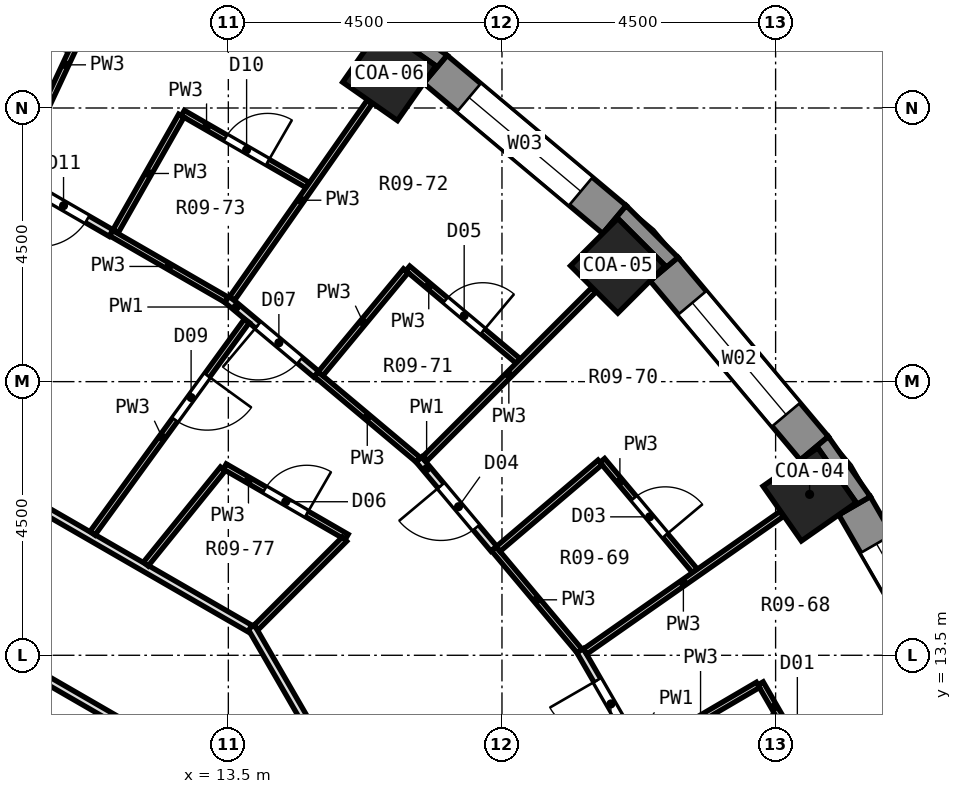
"""IFC4 building model, lengths in metres.
Left out: names, types, materials, properties, quantities, classifications, styles, units other than length and angle.
Written with IfcOpenShell. Run it as: python <this file> out.ifc"""

import sys

from ifc_helpers import new_model, si_unit, direction, frame, frame_2d, origin, origin_2d, place, context, subcontext, project, spatial, polyline, rectangle, outline, extrude, element, fill, save


model = new_model("IFC4")
c1 = context("Model", 3, precision=1e-05, world=origin(), true_north=direction((0.0, 1.0)))
c2 = subcontext(c1, "Body", "Model", "MODEL_VIEW")
j1 = project(units=[si_unit("LENGTHUNIT", "METRE"), si_unit("PLANEANGLEUNIT", "RADIAN")], contexts=[c1])
p1 = place(None, origin())
s1 = spatial("IfcSite", under=j1, at=p1, CompositionType="ELEMENT")
p2 = place(p1, origin())
s2 = spatial("IfcBuilding", under=s1, at=p2, CompositionType="ELEMENT")
p3 = place(p2, frame((0.0, 0.0, 26.3)))
s3 = spatial("IfcBuildingStorey", under=s2, at=p3, CompositionType="ELEMENT", Elevation=26.3)
p4 = place(p3, frame((23.059, 16.146, -0.55), z_axis=(0.0, 0.0, 1.0), x_axis=(0.819152044289, 0.573576436351, 0.0)))
e1 = element("IfcColumn", 1, at=p4, inside=s3, PredefinedType="COLUMN", context=c2, shape_type="SweptSolid", body=[
    extrude(rectangle(XDim=1.1, YDim=1.1, at=origin_2d()), origin(), (0.0, 0.0, 1.0), 3.85),
])
p5 = place(p3, frame((19.905, 19.905, 0.0), z_axis=(0.0, 0.0, 1.0), x_axis=(0.707106781187, 0.707106781187, 0.0)))
e2 = element("IfcColumn", 2, at=p5, inside=s3, PredefinedType="COLUMN", context=c2, shape_type="SweptSolid", body=[
    extrude(rectangle(XDim=1.1, YDim=1.1, at=origin_2d()), origin(), (0.0, 0.0, 1.0), 3.3),
])
p6 = place(p3, frame((16.146, 23.059, -0.55), z_axis=(0.0, 0.0, 1.0), x_axis=(0.573576436351, 0.819152044289, 0.0)))
e3 = element("IfcColumn", 3, at=p6, inside=s3, PredefinedType="COLUMN", context=c2, shape_type="SweptSolid", body=[
    extrude(rectangle(XDim=1.1, YDim=1.1, at=origin_2d()), origin(), (0.0, 0.0, 1.0), 3.85),
])
p7 = place(p3, frame((25.721, 12.63, 0.0), z_axis=(0.0, 0.0, 1.0), x_axis=(-0.499989888488, 0.86603124159, 0.0)))
e4 = element("IfcWall", 4, at=p7, inside=s3, PredefinedType="SOLIDWALL", context=c2, shape_type="SweptSolid", body=[
    extrude(rectangle(XDim=3.846, YDim=0.6, at=frame_2d((1.923, 0.0))), origin(), (0.0, 0.0, 1.0), 2.75),
])
p8 = place(p7, frame((0.723, 0.0, 0.9)))
e5 = element("IfcOpeningElement", 5, at=p8, cuts=e4, PredefinedType="OPENING", context=c2, shape_type="SweptSolid", body=[
    extrude(rectangle(XDim=2.4, YDim=1.8, at=frame_2d((1.2, 0.9))), frame((0.0, 0.312, 0.0), z_axis=(0.0, -1.0, 0.0), x_axis=(1.0, 0.0, 0.0)), (0.0, 0.0, 1.0), 0.624),
])
p9 = place(p3, frame((23.137, 16.904, 0.0), z_axis=(0.0, 0.0, 1.0), x_axis=(-0.642809392687, 0.766026164483, 0.0)))
e6 = element("IfcWall", 6, at=p9, inside=s3, PredefinedType="SOLIDWALL", context=c2, shape_type="SweptSolid", body=[
    extrude(rectangle(XDim=3.846, YDim=0.6, at=frame_2d((1.923, 0.0))), origin(), (0.0, 0.0, 1.0), 2.75),
])
p10 = place(p9, frame((0.723, 0.0, 0.9)))
e7 = element("IfcOpeningElement", 7, at=p10, cuts=e6, PredefinedType="OPENING", context=c2, shape_type="SweptSolid", body=[
    extrude(rectangle(XDim=2.4, YDim=1.8, at=frame_2d((1.2, 0.9))), frame((0.0, 0.312, 0.0), z_axis=(0.0, -1.0, 0.0), x_axis=(1.0, 0.0, 0.0)), (0.0, 0.0, 1.0), 0.624),
])
p11 = place(p3, frame((19.85, 20.665, 0.0), z_axis=(0.0, 0.0, 1.0), x_axis=(-0.766026164483, 0.642809392687, 0.0)))
e8 = element("IfcWall", 8, at=p11, inside=s3, PredefinedType="SOLIDWALL", context=c2, shape_type="SweptSolid", body=[
    extrude(rectangle(XDim=3.846, YDim=0.6, at=frame_2d((1.923, 0.0))), origin(), (0.0, 0.0, 1.0), 2.75),
])
p12 = place(p11, frame((0.723, 0.0, 0.9)))
e9 = element("IfcOpeningElement", 9, at=p12, cuts=e8, PredefinedType="OPENING", context=c2, shape_type="SweptSolid", body=[
    extrude(rectangle(XDim=2.4, YDim=1.8, at=frame_2d((1.2, 0.9))), frame((0.0, 0.312, 0.0), z_axis=(0.0, -1.0, 0.0), x_axis=(1.0, 0.0, 0.0)), (0.0, 0.0, 1.0), 0.624),
])
p13 = place(p3, origin())
e10 = element("IfcWall", 10, at=p13, inside=s3, PredefinedType="SOLIDWALL", context=c2, shape_type="SweptSolid", body=[
    extrude(outline(polyline([(24.058, 16.11), (23.367, 17.097), (22.907, 16.711), (23.194, 16.912), (23.825, 16.011), (23.538, 15.81), (24.058, 16.11)])), origin(), (0.0, 0.0, 1.0), 2.75),
])
p14 = place(p3, origin())
e11 = element("IfcWall", 11, at=p14, inside=s3, PredefinedType="SOLIDWALL", context=c2, shape_type="SweptSolid", body=[
    extrude(outline(polyline([(20.043, 20.895), (19.657, 20.435), (19.905, 20.683), (20.683, 19.905), (20.435, 19.657), (20.895, 20.043), (20.043, 20.895)])), origin(), (0.0, 0.0, 1.0), 2.75),
])
p15 = place(p3, origin())
e12 = element("IfcWall", 12, at=p15, inside=s3, PredefinedType="SOLIDWALL", context=c2, shape_type="SweptSolid", body=[
    extrude(outline(polyline([(17.097, 23.367), (16.11, 24.058), (15.81, 23.538), (16.011, 23.825), (16.912, 23.194), (16.711, 22.907), (17.097, 23.367)])), origin(), (0.0, 0.0, 1.0), 2.75),
])
p16 = place(p3, frame((13.873, 13.971, 0.0), z_axis=(0.0, 0.0, 1.0), x_axis=(0.500063859158, -0.865988531543, 0.0)))
e13 = element("IfcWall", 13, at=p16, inside=s3, PredefinedType="PARTITIONING", context=c2, shape_type="SweptSolid", body=[
    extrude(rectangle(XDim=4.168, YDim=0.125, at=frame_2d((2.084, 0.0))), origin(), (0.0, 0.0, 1.0), 2.75),
])
p17 = place(p3, frame((19.283, 13.58, 0.0), z_axis=(0.0, 0.0, 1.0), x_axis=(0.500206547268, -0.865906120818, 0.0)))
e14 = element("IfcWall", 14, at=p17, inside=s3, PredefinedType="PARTITIONING", context=c2, shape_type="SweptSolid", body=[
    extrude(rectangle(XDim=3.492, YDim=0.125, at=frame_2d((1.746, 0.0))), origin(), (0.0, 0.0, 1.0), 2.75),
])
p18 = place(p17, frame((0.566, 0.0, 0.0)))
e15 = element("IfcOpeningElement", 15, at=p18, cuts=e14, PredefinedType="OPENING", context=c2, shape_type="SweptSolid", body=[
    extrude(rectangle(XDim=0.9, YDim=2.1, at=frame_2d((0.45, 1.05))), frame((0.0, 0.074, 0.0), z_axis=(0.0, -1.0, 0.0), x_axis=(1.0, 0.0, 0.0)), (0.0, 0.0, 1.0), 0.149),
])
p19 = place(p3, frame((22.252, 13.038, 0.0), z_axis=(0.0, 0.0, 1.0), x_axis=(0.500073288705, -0.865983086396, 0.0)))
e16 = element("IfcWall", 16, at=p19, inside=s3, PredefinedType="PARTITIONING", context=c2, shape_type="SweptSolid", body=[
    extrude(rectangle(XDim=2.369, YDim=0.1, at=frame_2d((1.185, 0.0))), origin(), (0.0, 0.0, 1.0), 2.75),
])
p20 = place(p19, frame((0.811, 0.0, 0.0)))
e17 = element("IfcOpeningElement", 17, at=p20, cuts=e16, PredefinedType="OPENING", context=c2, shape_type="SweptSolid", body=[
    extrude(rectangle(XDim=0.8, YDim=2.1, at=frame_2d((0.4, 1.05))), frame((0.0, 0.062, 0.0), z_axis=(0.0, -1.0, 0.0), x_axis=(1.0, 0.0, 0.0)), (0.0, 0.0, 1.0), 0.124),
])
p21 = place(p3, frame((17.865, 15.252, 0.0), z_axis=(0.0, 0.0, 1.0), x_axis=(0.642711379907, -0.766108401036, 0.0)))
e18 = element("IfcWall", 18, at=p21, inside=s3, PredefinedType="PARTITIONING", context=c2, shape_type="SweptSolid", body=[
    extrude(rectangle(XDim=2.192, YDim=0.1, at=frame_2d((1.096, 0.0))), origin(), (0.0, 0.0, 1.0), 2.75),
])
p22 = place(p3, frame((16.632, 16.722, 0.0), z_axis=(0.0, 0.0, 1.0), x_axis=(0.64304586183, -0.765827669638, 0.0)))
e19 = element("IfcWall", 19, at=p22, inside=s3, PredefinedType="PARTITIONING", context=c2, shape_type="SweptSolid", body=[
    extrude(rectangle(XDim=1.919, YDim=0.125, at=frame_2d((0.959, 0.0))), origin(), (0.0, 0.0, 1.0), 2.75),
])
p23 = place(p22, frame((0.566, 0.0, 0.0)))
e20 = element("IfcOpeningElement", 20, at=p23, cuts=e19, PredefinedType="OPENING", context=c2, shape_type="SweptSolid", body=[
    extrude(rectangle(XDim=0.9, YDim=2.1, at=frame_2d((0.45, 1.05))), frame((0.0, 0.074, 0.0), z_axis=(0.0, -1.0, 0.0), x_axis=(1.0, 0.0, 0.0)), (0.0, 0.0, 1.0), 0.149),
])
p24 = place(p3, frame((19.65, 16.704, 0.0), z_axis=(0.0, 0.0, 1.0), x_axis=(0.642631758034, -0.766175191171, 0.0)))
e21 = element("IfcWall", 21, at=p24, inside=s3, PredefinedType="PARTITIONING", context=c2, shape_type="SweptSolid", body=[
    extrude(rectangle(XDim=2.371, YDim=0.1, at=frame_2d((1.186, 0.0))), origin(), (0.0, 0.0, 1.0), 2.75),
])
p25 = place(p24, frame((0.811, 0.0, 0.0)))
e22 = element("IfcOpeningElement", 22, at=p25, cuts=e21, PredefinedType="OPENING", context=c2, shape_type="SweptSolid", body=[
    extrude(rectangle(XDim=0.8, YDim=2.1, at=frame_2d((0.4, 1.05))), frame((0.0, 0.062, 0.0), z_axis=(0.0, -1.0, 0.0), x_axis=(1.0, 0.0, 0.0)), (0.0, 0.0, 1.0), 0.124),
])
p26 = place(p3, frame((14.946, 18.123, 0.0), z_axis=(0.0, 0.0, 1.0), x_axis=(0.765889072534, -0.642972727705, 0.0)))
e23 = element("IfcWall", 23, at=p26, inside=s3, PredefinedType="PARTITIONING", context=c2, shape_type="SweptSolid", body=[
    extrude(rectangle(XDim=2.193, YDim=0.1, at=frame_2d((1.096, 0.0))), origin(), (0.0, 0.0, 1.0), 2.75),
])
p27 = place(p3, frame((13.476, 19.356, 0.0), z_axis=(0.0, 0.0, 1.0), x_axis=(0.76614099915, -0.642672521135, 0.0)))
e24 = element("IfcWall", 24, at=p27, inside=s3, PredefinedType="PARTITIONING", context=c2, shape_type="SweptSolid", body=[
    extrude(rectangle(XDim=1.918, YDim=0.125, at=frame_2d((0.959, 0.0))), origin(), (0.0, 0.0, 1.0), 2.75),
])
p28 = place(p27, frame((0.666, 0.0, 0.0)))
e25 = element("IfcOpeningElement", 25, at=p28, cuts=e24, PredefinedType="OPENING", context=c2, shape_type="SweptSolid", body=[
    extrude(rectangle(XDim=0.9, YDim=2.1, at=frame_2d((0.45, 1.05))), frame((0.0, 0.074, 0.0), z_axis=(0.0, -1.0, 0.0), x_axis=(1.0, 0.0, 0.0)), (0.0, 0.0, 1.0), 0.149),
])
p29 = place(p3, frame((16.451, 19.862, 0.0), z_axis=(0.0, 0.0, 1.0), x_axis=(0.766132669123, -0.642682451373, 0.0)))
e26 = element("IfcWall", 26, at=p29, inside=s3, PredefinedType="PARTITIONING", context=c2, shape_type="SweptSolid", body=[
    extrude(rectangle(XDim=2.371, YDim=0.1, at=frame_2d((1.186, 0.0))), origin(), (0.0, 0.0, 1.0), 2.75),
])
p30 = place(p29, frame((0.811, 0.0, 0.0)))
e27 = element("IfcOpeningElement", 27, at=p30, cuts=e26, PredefinedType="OPENING", context=c2, shape_type="SweptSolid", body=[
    extrude(rectangle(XDim=0.8, YDim=2.1, at=frame_2d((0.4, 1.05))), frame((0.0, 0.062, 0.0), z_axis=(0.0, -1.0, 0.0), x_axis=(1.0, 0.0, 0.0)), (0.0, 0.0, 1.0), 0.124),
])
p31 = place(p3, frame((4.385, 16.636, 0.0), z_axis=(0.0, 0.0, 1.0), x_axis=(0.866033263559, -0.499986386223, 0.0)))
e28 = element("IfcWall", 28, at=p31, inside=s3, PredefinedType="PARTITIONING", context=c2, shape_type="SweptSolid", body=[
    extrude(rectangle(XDim=8.968, YDim=0.125, at=frame_2d((4.484, 0.0))), origin(), (0.0, 0.0, 1.0), 2.75),
])
p32 = place(p3, frame((5.029, 19.036, 0.0), z_axis=(0.0, 0.0, 1.0), x_axis=(0.866024825845, -0.50000100102, 0.0)))
e29 = element("IfcWall", 29, at=p32, inside=s3, PredefinedType="PARTITIONING", context=c2, shape_type="SweptSolid", body=[
    extrude(rectangle(XDim=10.192, YDim=0.125, at=frame_2d((5.096, 0.0))), origin(), (0.0, 0.0, 1.0), 2.75),
])
p33 = place(p32, frame((3.116, 0.0, 0.0)))
e30 = element("IfcOpeningElement", 30, at=p33, cuts=e29, PredefinedType="OPENING", context=c2, shape_type="SweptSolid", body=[
    extrude(rectangle(XDim=1.0, YDim=2.1, at=frame_2d((0.5, 1.05))), frame((0.0, 0.074, 0.0), z_axis=(0.0, -1.0, 0.0), x_axis=(1.0, 0.0, 0.0)), (0.0, 0.0, 1.0), 0.149),
])
p34 = place(p3, frame((13.441, 16.604, 0.0), z_axis=(0.0, 0.0, 1.0), x_axis=(0.865969595378, -0.500096650539, 0.0)))
e31 = element("IfcWall", 31, at=p34, inside=s3, PredefinedType="PARTITIONING", context=c2, shape_type="SweptSolid", body=[
    extrude(rectangle(XDim=2.315, YDim=0.1, at=frame_2d((1.158, 0.0))), origin(), (0.0, 0.0, 1.0), 2.75),
])
p35 = place(p34, frame((0.758, 0.0, 0.0)))
e32 = element("IfcOpeningElement", 32, at=p35, cuts=e31, PredefinedType="OPENING", context=c2, shape_type="SweptSolid", body=[
    extrude(rectangle(XDim=0.8, YDim=2.1, at=frame_2d((0.4, 1.05))), frame((0.0, 0.062, 0.0), z_axis=(0.0, -1.0, 0.0), x_axis=(1.0, 0.0, 0.0)), (0.0, 0.0, 1.0), 0.124),
])
p36 = place(p3, frame((11.572, 20.443, 0.0), z_axis=(0.0, 0.0, 1.0), x_axis=(0.865939000713, -0.500149624657, 0.0)))
e33 = element("IfcWall", 33, at=p36, inside=s3, PredefinedType="PARTITIONING", context=c2, shape_type="SweptSolid", body=[
    extrude(rectangle(XDim=2.193, YDim=0.1, at=frame_2d((1.097, 0.0))), origin(), (0.0, 0.0, 1.0), 2.75),
])
p37 = place(p3, frame((9.91, 21.402, 0.0), z_axis=(0.0, 0.0, 1.0), x_axis=(0.866191941426, -0.499711437341, 0.0)))
e34 = element("IfcWall", 34, at=p37, inside=s3, PredefinedType="PARTITIONING", context=c2, shape_type="SweptSolid", body=[
    extrude(rectangle(XDim=1.919, YDim=0.125, at=frame_2d((0.959, 0.0))), origin(), (0.0, 0.0, 1.0), 2.75),
])
p38 = place(p37, frame((0.566, 0.0, 0.0)))
e35 = element("IfcOpeningElement", 35, at=p38, cuts=e34, PredefinedType="OPENING", context=c2, shape_type="SweptSolid", body=[
    extrude(rectangle(XDim=0.9, YDim=2.1, at=frame_2d((0.45, 1.05))), frame((0.0, 0.074, 0.0), z_axis=(0.0, -1.0, 0.0), x_axis=(1.0, 0.0, 0.0)), (0.0, 0.0, 1.0), 0.149),
])
p39 = place(p3, frame((12.752, 22.417, 0.0), z_axis=(0.0, 0.0, 1.0), x_axis=(0.865984969814, -0.500070027153, 0.0)))
e36 = element("IfcWall", 36, at=p39, inside=s3, PredefinedType="PARTITIONING", context=c2, shape_type="SweptSolid", body=[
    extrude(rectangle(XDim=2.371, YDim=0.1, at=frame_2d((1.186, 0.0))), origin(), (0.0, 0.0, 1.0), 2.75),
])
p40 = place(p39, frame((0.811, 0.0, 0.0)))
e37 = element("IfcOpeningElement", 37, at=p40, cuts=e36, PredefinedType="OPENING", context=c2, shape_type="SweptSolid", body=[
    extrude(rectangle(XDim=0.8, YDim=2.1, at=frame_2d((0.4, 1.05))), frame((0.0, 0.062, 0.0), z_axis=(0.0, -1.0, 0.0), x_axis=(1.0, 0.0, 0.0)), (0.0, 0.0, 1.0), 0.124),
])
p41 = place(p3, frame((20.322, 11.906, 0.0), z_axis=(0.0, 0.0, 1.0), x_axis=(0.862687894762, 0.505736686657, 0.0)))
e38 = element("IfcWall", 38, at=p41, inside=s3, PredefinedType="PARTITIONING", context=c2, shape_type="SweptSolid", body=[
    extrude(rectangle(XDim=2.187, YDim=0.1, at=frame_2d((1.094, 0.0))), origin(), (0.0, 0.0, 1.0), 2.75),
])
p42 = place(p3, frame((19.366, 13.561, 0.0), z_axis=(0.0, 0.0, 1.0), x_axis=(0.819199961449, 0.57350799747, 0.0)))
e39 = element("IfcWall", 39, at=p42, inside=s3, PredefinedType="PARTITIONING", context=c2, shape_type="SweptSolid", body=[
    extrude(rectangle(XDim=3.948, YDim=0.1, at=frame_2d((1.974, 0.0))), origin(), (0.0, 0.0, 1.0), 2.75),
])
p43 = place(p3, frame((17.936, 15.246, 0.0), z_axis=(0.0, 0.0, 1.0), x_axis=(0.76174213422, 0.647880329192, 0.0)))
e40 = element("IfcWall", 40, at=p43, inside=s3, PredefinedType="PARTITIONING", context=c2, shape_type="SweptSolid", body=[
    extrude(rectangle(XDim=2.2, YDim=0.1, at=frame_2d((1.1, 0.0))), origin(), (0.0, 0.0, 1.0), 2.75),
])
p44 = place(p3, frame((13.953, 13.953, 0.0), z_axis=(0.0, 0.0, 1.0), x_axis=(0.707106781187, 0.707106781187, 0.0)))
e41 = element("IfcWall", 41, at=p44, inside=s3, PredefinedType="PARTITIONING", context=c2, shape_type="SweptSolid", body=[
    extrude(rectangle(XDim=2.061, YDim=0.1, at=frame_2d((1.031, 0.0))), origin(), (0.0, 0.0, 1.0), 2.75),
])
p45 = place(p3, frame((16.717, 16.717, 0.0), z_axis=(0.0, 0.0, 1.0), x_axis=(0.707106781187, 0.707106781187, 0.0)))
e42 = element("IfcWall", 42, at=p45, inside=s3, PredefinedType="PARTITIONING", context=c2, shape_type="SweptSolid", body=[
    extrude(rectangle(XDim=3.948, YDim=0.1, at=frame_2d((1.974, 0.0))), origin(), (0.0, 0.0, 1.0), 2.75),
])
p46 = place(p3, frame((15.016, 18.129, 0.0), z_axis=(0.0, 0.0, 1.0), x_axis=(0.63792197303, 0.770101003976, 0.0)))
e43 = element("IfcWall", 43, at=p46, inside=s3, PredefinedType="PARTITIONING", context=c2, shape_type="SweptSolid", body=[
    extrude(rectangle(XDim=2.2, YDim=0.1, at=frame_2d((1.1, 0.0))), origin(), (0.0, 0.0, 1.0), 2.75),
])
p47 = place(p3, frame((12.143, 15.0, 0.0), z_axis=(0.0, 0.0, 1.0), x_axis=(0.629135445443, 0.777295691026, 0.0)))
e44 = element("IfcWall", 44, at=p47, inside=s3, PredefinedType="PARTITIONING", context=c2, shape_type="SweptSolid", body=[
    extrude(rectangle(XDim=2.014, YDim=0.1, at=frame_2d((1.007, 0.0))), origin(), (0.0, 0.0, 1.0), 2.75),
])
p48 = place(p3, frame((11.266, 15.507, 0.0), z_axis=(0.0, 0.0, 1.0), x_axis=(0.587926223092, 0.808914554326, 0.0)))
e45 = element("IfcWall", 45, at=p48, inside=s3, PredefinedType="PARTITIONING", context=c2, shape_type="SweptSolid", body=[
    extrude(rectangle(XDim=4.317, YDim=0.1, at=frame_2d((2.159, 0.0))), origin(), (0.0, 0.0, 1.0), 2.75),
])
p49 = place(p48, frame((2.309, 0.0, 0.0)))
e46 = element("IfcOpeningElement", 46, at=p49, cuts=e45, PredefinedType="OPENING", context=c2, shape_type="SweptSolid", body=[
    extrude(rectangle(XDim=0.9, YDim=2.1, at=frame_2d((0.45, 1.05))), frame((0.0, 0.062, 0.0), z_axis=(0.0, -1.0, 0.0), x_axis=(1.0, 0.0, 0.0)), (0.0, 0.0, 1.0), 0.124),
])
p50 = place(p3, frame((13.561, 19.366, 0.0), z_axis=(0.0, 0.0, 1.0), x_axis=(0.573366885016, 0.819298733776, 0.0)))
e47 = element("IfcWall", 47, at=p50, inside=s3, PredefinedType="PARTITIONING", context=c2, shape_type="SweptSolid", body=[
    extrude(rectangle(XDim=3.948, YDim=0.1, at=frame_2d((1.974, 0.0))), origin(), (0.0, 0.0, 1.0), 2.75),
])
p51 = place(p3, frame((11.646, 20.472, 0.0), z_axis=(0.0, 0.0, 1.0), x_axis=(0.494394843989, 0.869237446408, 0.0)))
e48 = element("IfcWall", 48, at=p51, inside=s3, PredefinedType="PARTITIONING", context=c2, shape_type="SweptSolid", body=[
    extrude(rectangle(XDim=2.187, YDim=0.1, at=frame_2d((1.094, 0.0))), origin(), (0.0, 0.0, 1.0), 2.75),
])
p52 = place(p3, frame((9.984, 21.416, 0.0), z_axis=(0.0, 0.0, 1.0), x_axis=(0.423587219874, 0.905855323525, 0.0)))
e49 = element("IfcWall", 49, at=p52, inside=s3, PredefinedType="PARTITIONING", context=c2, shape_type="SweptSolid", body=[
    extrude(rectangle(XDim=3.961, YDim=0.1, at=frame_2d((1.98, 0.0))), origin(), (0.0, 0.0, 1.0), 2.75),
])
p53 = place(p8, origin())
e50 = element("IfcWindow", 50, at=p53, inside=s3, PartitioningType="SINGLE_PANEL", PredefinedType="WINDOW", context=c2, shape_type="SweptSolid", body=[
    extrude(rectangle(XDim=2.4, YDim=1.8, at=frame_2d((1.2, 0.9))), frame((0.0, 0.18, 0.0), z_axis=(0.0, -1.0, 0.0), x_axis=(1.0, 0.0, 0.0)), (0.0, 0.0, 1.0), 0.06),
])
fill(e5, e50)
p54 = place(p10, origin())
e51 = element("IfcWindow", 51, at=p54, inside=s3, PartitioningType="SINGLE_PANEL", PredefinedType="WINDOW", context=c2, shape_type="SweptSolid", body=[
    extrude(rectangle(XDim=2.4, YDim=1.8, at=frame_2d((1.2, 0.9))), frame((0.0, 0.18, 0.0), z_axis=(0.0, -1.0, 0.0), x_axis=(1.0, 0.0, 0.0)), (0.0, 0.0, 1.0), 0.06),
])
fill(e7, e51)
p55 = place(p12, origin())
e52 = element("IfcWindow", 52, at=p55, inside=s3, PartitioningType="SINGLE_PANEL", PredefinedType="WINDOW", context=c2, shape_type="SweptSolid", body=[
    extrude(rectangle(XDim=2.4, YDim=1.8, at=frame_2d((1.2, 0.9))), frame((0.0, 0.18, 0.0), z_axis=(0.0, -1.0, 0.0), x_axis=(1.0, 0.0, 0.0)), (0.0, 0.0, 1.0), 0.06),
])
fill(e9, e52)
p56 = place(p18, frame((0.9, 0.0, 0.0), z_axis=(0.0, 0.0, 1.0), x_axis=(-1.0, 0.0, 0.0)))
e53 = element("IfcDoor", 53, at=p56, inside=s3, OperationType="SINGLE_SWING_RIGHT", PredefinedType="DOOR", context=c2, shape_type="SweptSolid", body=[
    extrude(rectangle(XDim=0.9, YDim=2.1, at=frame_2d((0.45, 1.05))), frame((0.0, 0.025, 0.0), z_axis=(0.0, -1.0, 0.0), x_axis=(1.0, 0.0, 0.0)), (0.0, 0.0, 1.0), 0.05),
])
fill(e15, e53)
p57 = place(p25, origin())
e54 = element("IfcDoor", 54, at=p57, inside=s3, OperationType="SINGLE_SWING_RIGHT", PredefinedType="DOOR", context=c2, shape_type="SweptSolid", body=[
    extrude(rectangle(XDim=0.8, YDim=2.1, at=frame_2d((0.4, 1.05))), frame((0.0, 0.025, 0.0), z_axis=(0.0, -1.0, 0.0), x_axis=(1.0, 0.0, 0.0)), (0.0, 0.0, 1.0), 0.05),
])
fill(e22, e54)
p58 = place(p23, frame((0.9, 0.0, 0.0), z_axis=(0.0, 0.0, 1.0), x_axis=(-1.0, 0.0, 0.0)))
e55 = element("IfcDoor", 55, at=p58, inside=s3, OperationType="SINGLE_SWING_RIGHT", PredefinedType="DOOR", context=c2, shape_type="SweptSolid", body=[
    extrude(rectangle(XDim=0.9, YDim=2.1, at=frame_2d((0.45, 1.05))), frame((0.0, 0.025, 0.0), z_axis=(0.0, -1.0, 0.0), x_axis=(1.0, 0.0, 0.0)), (0.0, 0.0, 1.0), 0.05),
])
fill(e20, e55)
p59 = place(p30, origin())
e56 = element("IfcDoor", 56, at=p59, inside=s3, OperationType="SINGLE_SWING_RIGHT", PredefinedType="DOOR", context=c2, shape_type="SweptSolid", body=[
    extrude(rectangle(XDim=0.8, YDim=2.1, at=frame_2d((0.4, 1.05))), frame((0.0, 0.025, 0.0), z_axis=(0.0, -1.0, 0.0), x_axis=(1.0, 0.0, 0.0)), (0.0, 0.0, 1.0), 0.05),
])
fill(e27, e56)
p60 = place(p35, origin())
e57 = element("IfcDoor", 57, at=p60, inside=s3, OperationType="SINGLE_SWING_RIGHT", PredefinedType="DOOR", context=c2, shape_type="SweptSolid", body=[
    extrude(rectangle(XDim=0.8, YDim=2.1, at=frame_2d((0.4, 1.05))), frame((0.0, 0.025, 0.0), z_axis=(0.0, -1.0, 0.0), x_axis=(1.0, 0.0, 0.0)), (0.0, 0.0, 1.0), 0.05),
])
fill(e32, e57)
p61 = place(p28, frame((0.9, 0.0, 0.0), z_axis=(0.0, 0.0, 1.0), x_axis=(-1.0, 0.0, 0.0)))
e58 = element("IfcDoor", 58, at=p61, inside=s3, OperationType="SINGLE_SWING_RIGHT", PredefinedType="DOOR", context=c2, shape_type="SweptSolid", body=[
    extrude(rectangle(XDim=0.9, YDim=2.1, at=frame_2d((0.45, 1.05))), frame((0.0, 0.025, 0.0), z_axis=(0.0, -1.0, 0.0), x_axis=(1.0, 0.0, 0.0)), (0.0, 0.0, 1.0), 0.05),
])
fill(e25, e58)
p62 = place(p49, frame((0.9, 0.0, 0.0), z_axis=(0.0, 0.0, 1.0), x_axis=(-1.0, 0.0, 0.0)))
e59 = element("IfcDoor", 59, at=p62, inside=s3, OperationType="SINGLE_SWING_LEFT", PredefinedType="DOOR", context=c2, shape_type="SweptSolid", body=[
    extrude(rectangle(XDim=0.9, YDim=2.1, at=frame_2d((0.45, 1.05))), frame((0.0, 0.025, 0.0), z_axis=(0.0, -1.0, 0.0), x_axis=(1.0, 0.0, 0.0)), (0.0, 0.0, 1.0), 0.05),
])
fill(e46, e59)
p63 = place(p40, origin())
e60 = element("IfcDoor", 60, at=p63, inside=s3, OperationType="SINGLE_SWING_RIGHT", PredefinedType="DOOR", context=c2, shape_type="SweptSolid", body=[
    extrude(rectangle(XDim=0.8, YDim=2.1, at=frame_2d((0.4, 1.05))), frame((0.0, 0.025, 0.0), z_axis=(0.0, -1.0, 0.0), x_axis=(1.0, 0.0, 0.0)), (0.0, 0.0, 1.0), 0.05),
])
fill(e37, e60)
p64 = place(p38, frame((0.9, 0.0, 0.0), z_axis=(0.0, 0.0, 1.0), x_axis=(-1.0, 0.0, 0.0)))
e61 = element("IfcDoor", 61, at=p64, inside=s3, OperationType="SINGLE_SWING_RIGHT", PredefinedType="DOOR", context=c2, shape_type="SweptSolid", body=[
    extrude(rectangle(XDim=0.9, YDim=2.1, at=frame_2d((0.45, 1.05))), frame((0.0, 0.025, 0.0), z_axis=(0.0, -1.0, 0.0), x_axis=(1.0, 0.0, 0.0)), (0.0, 0.0, 1.0), 0.05),
])
fill(e35, e61)
save(model, sys.argv[1])
